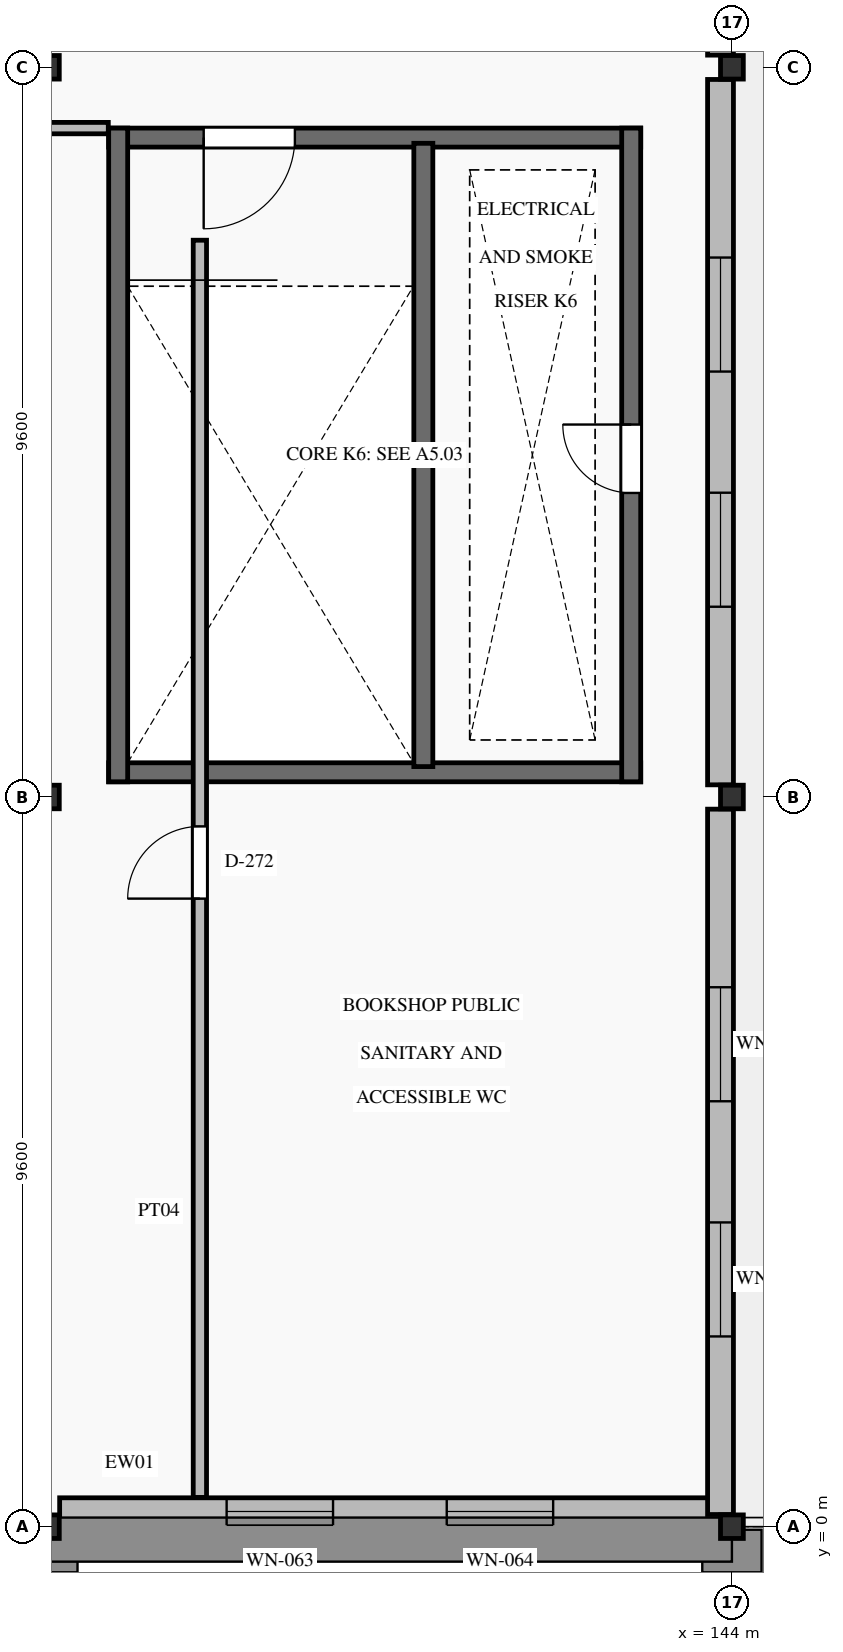
"""IFC4 building model, lengths in metres.
Left out: names, types, materials, properties, quantities, classifications, styles, units other than length and angle.
Written with IfcOpenShell. Run it as: python <this file> out.ifc"""

import sys

from ifc_helpers import new_model, si_unit, direction, frame, frame_2d, origin, origin_2d, place, context, subcontext, project, spatial, rectangle, i_section, extrude, element, fill, save


model = new_model("IFC4")
c1 = context("Model", 3, precision=1e-05, world=origin(), true_north=direction((0.0, 1.0)))
c2 = subcontext(c1, "Body", "Model", "MODEL_VIEW")
j1 = project(units=[si_unit("LENGTHUNIT", "METRE"), si_unit("PLANEANGLEUNIT", "RADIAN")], contexts=[c1])
p1 = place(None, origin())
s1 = spatial("IfcSite", under=j1, at=p1, CompositionType="ELEMENT")
p2 = place(p1, origin())
s2 = spatial("IfcBuilding", under=s1, at=p2, CompositionType="ELEMENT")
p3 = place(p2, frame((0.0, 0.0, 15.0)))
s3 = spatial("IfcBuildingStorey", under=s2, at=p3, CompositionType="ELEMENT", Elevation=15.0)
for number, where, z_axis, x_axis in (
    (1, (135.0, 0.0, 0.0), (0.0, 0.0, 1.0), (1.0, 0.0, 0.0)),
    (2, (135.0, 9.6, 0.0), (0.0, 0.0, 1.0), (1.0, 0.0, 0.0)),
    (3, (135.0, 19.2, 0.0), (0.0, 0.0, 1.0), (1.0, 0.0, 0.0)),
    (4, (144.0, 0.0, 0.0), (0.0, 0.0, 1.0), (1.0, 0.0, 0.0)),
    (5, (144.0, 9.6, 0.0), (0.0, 0.0, 1.0), (1.0, 0.0, 0.0)),
    (6, (144.0, 19.2, 0.0), (0.0, 0.0, 1.0), (1.0, 0.0, 0.0)),
):
    element("IfcColumn", number, at=place(p3, frame(where, z_axis=z_axis, x_axis=x_axis)), inside=s3, PredefinedType="COLUMN", context=c2, shape_type="SweptSolid", body=[
        extrude(i_section(OverallWidth=0.3, OverallDepth=0.31, WebThickness=0.009, FlangeThickness=0.015, FilletRadius=0.027, at=origin_2d()), origin(), (0.0, 0.0, 1.0), 3.9),
    ])
p4 = place(p3, frame((135.155, 0.2, 0.0), z_axis=(0.0, 0.0, 1.0), x_axis=(1.0, 0.0, 0.0)))
e7 = element("IfcWall", 7, at=p4, inside=s3, PredefinedType="SOLIDWALL", context=c2, shape_type="SweptSolid", body=[
    extrude(rectangle(XDim=8.69, YDim=0.36, at=frame_2d((4.345, 0.0))), origin(), (0.0, 0.0, 1.0), 3.355),
])
p5 = place(p4, frame((2.197, 0.0, 0.95)))
e8 = element("IfcOpeningElement", 8, at=p5, cuts=e7, PredefinedType="OPENING", context=c2, shape_type="SweptSolid", body=[
    extrude(rectangle(XDim=1.4, YDim=2.0, at=frame_2d((0.7, 1.0))), frame((0.0, 0.195, 0.0), z_axis=(0.0, -1.0, 0.0), x_axis=(1.0, 0.0, 0.0)), (0.0, 0.0, 1.0), 0.39),
])
p6 = place(p4, frame((5.093, 0.0, 0.95)))
e9 = element("IfcOpeningElement", 9, at=p6, cuts=e7, PredefinedType="OPENING", context=c2, shape_type="SweptSolid", body=[
    extrude(rectangle(XDim=1.4, YDim=2.0, at=frame_2d((0.7, 1.0))), frame((0.0, 0.195, 0.0), z_axis=(0.0, -1.0, 0.0), x_axis=(1.0, 0.0, 0.0)), (0.0, 0.0, 1.0), 0.39),
])
p7 = place(p3, frame((143.85, 0.16, 0.0), z_axis=(0.0, 0.0, 1.0), x_axis=(0.0, 1.0, 0.0)))
e10 = element("IfcWall", 10, at=p7, inside=s3, PredefinedType="SOLIDWALL", context=c2, shape_type="SweptSolid", body=[
    extrude(rectangle(XDim=9.28, YDim=0.34, at=frame_2d((4.64, 0.0))), origin(), (0.0, 0.0, 1.0), 3.335),
])
p8 = place(p7, frame((2.343, 0.0, 0.95)))
e11 = element("IfcOpeningElement", 11, at=p8, cuts=e10, PredefinedType="OPENING", context=c2, shape_type="SweptSolid", body=[
    extrude(rectangle(XDim=1.5, YDim=2.1, at=frame_2d((0.75, 1.05))), frame((0.0, 0.185, 0.0), z_axis=(0.0, -1.0, 0.0), x_axis=(1.0, 0.0, 0.0)), (0.0, 0.0, 1.0), 0.37),
])
p9 = place(p7, frame((5.437, 0.0, 0.95)))
e12 = element("IfcOpeningElement", 12, at=p9, cuts=e10, PredefinedType="OPENING", context=c2, shape_type="SweptSolid", body=[
    extrude(rectangle(XDim=1.5, YDim=2.1, at=frame_2d((0.75, 1.05))), frame((0.0, 0.185, 0.0), z_axis=(0.0, -1.0, 0.0), x_axis=(1.0, 0.0, 0.0)), (0.0, 0.0, 1.0), 0.37),
])
p10 = place(p3, frame((143.85, 9.76, 0.0), z_axis=(0.0, 0.0, 1.0), x_axis=(0.0, 1.0, 0.0)))
e13 = element("IfcWall", 13, at=p10, inside=s3, PredefinedType="SOLIDWALL", context=c2, shape_type="SweptSolid", body=[
    extrude(rectangle(XDim=9.28, YDim=0.34, at=frame_2d((4.64, 0.0))), origin(), (0.0, 0.0, 1.0), 3.335),
])
p11 = place(p10, frame((2.343, 0.0, 0.95)))
e14 = element("IfcOpeningElement", 14, at=p11, cuts=e13, PredefinedType="OPENING", context=c2, shape_type="SweptSolid", body=[
    extrude(rectangle(XDim=1.5, YDim=2.1, at=frame_2d((0.75, 1.05))), frame((0.0, 0.185, 0.0), z_axis=(0.0, -1.0, 0.0), x_axis=(1.0, 0.0, 0.0)), (0.0, 0.0, 1.0), 0.37),
])
p12 = place(p10, frame((5.437, 0.0, 0.95)))
e15 = element("IfcOpeningElement", 15, at=p12, cuts=e13, PredefinedType="OPENING", context=c2, shape_type="SweptSolid", body=[
    extrude(rectangle(XDim=1.5, YDim=2.1, at=frame_2d((0.75, 1.05))), frame((0.0, 0.185, 0.0), z_axis=(0.0, -1.0, 0.0), x_axis=(1.0, 0.0, 0.0)), (0.0, 0.0, 1.0), 0.37),
])
p13 = place(p3, frame((143.85, 19.36, 0.0), z_axis=(0.0, 0.0, 1.0), x_axis=(0.0, 1.0, 0.0)))
e16 = element("IfcWall", 16, at=p13, inside=s3, PredefinedType="SOLIDWALL", context=c2, shape_type="SweptSolid", body=[
    extrude(rectangle(XDim=9.28, YDim=0.34, at=frame_2d((4.64, 0.0))), origin(), (0.0, 0.0, 1.0), 3.335),
])
p14 = place(p13, frame((2.343, 0.0, 0.95)))
e17 = element("IfcOpeningElement", 17, at=p14, cuts=e16, PredefinedType="OPENING", context=c2, shape_type="SweptSolid", body=[
    extrude(rectangle(XDim=1.5, YDim=2.1, at=frame_2d((0.75, 1.05))), frame((0.0, 0.185, 0.0), z_axis=(0.0, -1.0, 0.0), x_axis=(1.0, 0.0, 0.0)), (0.0, 0.0, 1.0), 0.37),
])
p15 = place(p13, frame((5.437, 0.0, 0.95)))
e18 = element("IfcOpeningElement", 18, at=p15, cuts=e16, PredefinedType="OPENING", context=c2, shape_type="SweptSolid", body=[
    extrude(rectangle(XDim=1.5, YDim=2.1, at=frame_2d((0.75, 1.05))), frame((0.0, 0.185, 0.0), z_axis=(0.0, -1.0, 0.0), x_axis=(1.0, 0.0, 0.0)), (0.0, 0.0, 1.0), 0.37),
])
p16 = place(p3, frame((135.8, 9.925, 0.0), z_axis=(0.0, 0.0, 1.0), x_axis=(1.0, 0.0, 0.0)))
e19 = element("IfcWall", 19, at=p16, inside=s3, PredefinedType="SHEAR", context=c2, shape_type="SweptSolid", body=[
    extrude(rectangle(XDim=7.0, YDim=0.25, at=frame_2d((3.5, 0.0))), origin(), (0.0, 0.0, 1.0), 3.9),
])
p17 = place(p3, frame((135.8, 18.275, 0.0), z_axis=(0.0, 0.0, 1.0), x_axis=(1.0, 0.0, 0.0)))
e20 = element("IfcWall", 20, at=p17, inside=s3, PredefinedType="SHEAR", context=c2, shape_type="SweptSolid", body=[
    extrude(rectangle(XDim=7.0, YDim=0.25, at=frame_2d((3.5, 0.0))), origin(), (0.0, 0.0, 1.0), 3.9),
])
p18 = place(p17, frame((1.25, 0.0, 0.0)))
e21 = element("IfcOpeningElement", 21, at=p18, cuts=e20, PredefinedType="OPENING", context=c2, shape_type="SweptSolid", body=[
    extrude(rectangle(XDim=1.2, YDim=2.15, at=frame_2d((0.6, 1.075))), frame((0.0, 0.14, 0.0), z_axis=(0.0, -1.0, 0.0), x_axis=(1.0, 0.0, 0.0)), (0.0, 0.0, 1.0), 0.28),
])
p19 = place(p3, frame((135.925, 9.8, 0.0), z_axis=(0.0, 0.0, 1.0), x_axis=(0.0, 1.0, 0.0)))
e22 = element("IfcWall", 22, at=p19, inside=s3, PredefinedType="SHEAR", context=c2, shape_type="SweptSolid", body=[
    extrude(rectangle(XDim=8.6, YDim=0.25, at=frame_2d((4.3, 0.0))), origin(), (0.0, 0.0, 1.0), 3.9),
])
p20 = place(p3, frame((142.675, 9.8, 0.0), z_axis=(0.0, 0.0, 1.0), x_axis=(0.0, 1.0, 0.0)))
e23 = element("IfcWall", 23, at=p20, inside=s3, PredefinedType="SHEAR", context=c2, shape_type="SweptSolid", body=[
    extrude(rectangle(XDim=8.6, YDim=0.25, at=frame_2d((4.3, 0.0))), origin(), (0.0, 0.0, 1.0), 3.9),
])
p21 = place(p20, frame((3.8, 0.0, 0.0)))
e24 = element("IfcOpeningElement", 24, at=p21, cuts=e23, PredefinedType="OPENING", context=c2, shape_type="SweptSolid", body=[
    extrude(rectangle(XDim=0.9, YDim=2.05, at=frame_2d((0.45, 1.025))), frame((0.0, 0.14, 0.0), z_axis=(0.0, -1.0, 0.0), x_axis=(1.0, 0.0, 0.0)), (0.0, 0.0, 1.0), 0.28),
])
p22 = place(p3, frame((139.94, 10.0, 0.0), z_axis=(0.0, 0.0, 1.0), x_axis=(0.0, 1.0, 0.0)))
e25 = element("IfcWall", 25, at=p22, inside=s3, PredefinedType="SHEAR", context=c2, shape_type="SweptSolid", body=[
    extrude(rectangle(XDim=8.2, YDim=0.25, at=frame_2d((4.1, 0.0))), origin(), (0.0, 0.0, 1.0), 3.9),
])
p23 = place(p3, frame((129.75, 18.4, 0.0), z_axis=(0.0, 0.0, 1.0), x_axis=(1.0, 0.0, 0.0)))
e26 = element("IfcWall", 26, at=p23, inside=s3, PredefinedType="PARTITIONING", context=c2, shape_type="SweptSolid", body=[
    extrude(rectangle(XDim=6.045, YDim=0.15, at=frame_2d((3.022, 0.0))), origin(), (0.0, 0.0, 1.0), 3.64),
])
p24 = place(p23, frame((2.145, 0.0, 0.0)))
e27 = element("IfcOpeningElement", 27, at=p24, cuts=e26, PredefinedType="OPENING", context=c2, shape_type="SweptSolid", body=[
    extrude(rectangle(XDim=1.6, YDim=2.25, at=frame_2d((0.8, 1.125))), frame((0.0, 0.09, 0.0), z_axis=(0.0, -1.0, 0.0), x_axis=(1.0, 0.0, 0.0)), (0.0, 0.0, 1.0), 0.18),
])
p25 = place(p3, frame((137.0, 0.385, 0.0), z_axis=(0.0, 0.0, 1.0), x_axis=(0.0, 1.0, 0.0)))
e28 = element("IfcWall", 28, at=p25, inside=s3, PredefinedType="PARTITIONING", context=c2, shape_type="SweptSolid", body=[
    extrude(rectangle(XDim=16.54, YDim=0.175, at=frame_2d((8.27, 0.0))), origin(), (0.0, 0.0, 1.0), 3.64),
])
p26 = place(p25, frame((7.878, 0.0, 0.0)))
e29 = element("IfcOpeningElement", 29, at=p26, cuts=e28, PredefinedType="OPENING", context=c2, shape_type="SweptSolid", body=[
    extrude(rectangle(XDim=0.95, YDim=2.1, at=frame_2d((0.475, 1.05))), frame((0.0, 0.103, 0.0), z_axis=(0.0, -1.0, 0.0), x_axis=(1.0, 0.0, 0.0)), (0.0, 0.0, 1.0), 0.205),
])
p27 = place(p5, origin())
e30 = element("IfcWindow", 30, at=p27, inside=s3, PartitioningType="SINGLE_PANEL", PredefinedType="WINDOW", context=c2, shape_type="SweptSolid", body=[
    extrude(rectangle(XDim=1.4, YDim=2.0, at=frame_2d((0.7, 1.0))), frame((0.0, 0.03, 0.0), z_axis=(0.0, -1.0, 0.0), x_axis=(1.0, 0.0, 0.0)), (0.0, 0.0, 1.0), 0.06),
])
fill(e8, e30)
p28 = place(p6, origin())
e31 = element("IfcWindow", 31, at=p28, inside=s3, PartitioningType="SINGLE_PANEL", PredefinedType="WINDOW", context=c2, shape_type="SweptSolid", body=[
    extrude(rectangle(XDim=1.4, YDim=2.0, at=frame_2d((0.7, 1.0))), frame((0.0, 0.03, 0.0), z_axis=(0.0, -1.0, 0.0), x_axis=(1.0, 0.0, 0.0)), (0.0, 0.0, 1.0), 0.06),
])
fill(e9, e31)
p29 = place(p8, origin())
e32 = element("IfcWindow", 32, at=p29, inside=s3, PartitioningType="SINGLE_PANEL", PredefinedType="WINDOW", context=c2, shape_type="SweptSolid", body=[
    extrude(rectangle(XDim=1.5, YDim=2.1, at=frame_2d((0.75, 1.05))), frame((0.0, 0.03, 0.0), z_axis=(0.0, -1.0, 0.0), x_axis=(1.0, 0.0, 0.0)), (0.0, 0.0, 1.0), 0.06),
])
fill(e11, e32)
p30 = place(p9, origin())
e33 = element("IfcWindow", 33, at=p30, inside=s3, PartitioningType="SINGLE_PANEL", PredefinedType="WINDOW", context=c2, shape_type="SweptSolid", body=[
    extrude(rectangle(XDim=1.5, YDim=2.1, at=frame_2d((0.75, 1.05))), frame((0.0, 0.03, 0.0), z_axis=(0.0, -1.0, 0.0), x_axis=(1.0, 0.0, 0.0)), (0.0, 0.0, 1.0), 0.06),
])
fill(e12, e33)
p31 = place(p11, origin())
e34 = element("IfcWindow", 34, at=p31, inside=s3, PartitioningType="SINGLE_PANEL", PredefinedType="WINDOW", context=c2, shape_type="SweptSolid", body=[
    extrude(rectangle(XDim=1.5, YDim=2.1, at=frame_2d((0.75, 1.05))), frame((0.0, 0.03, 0.0), z_axis=(0.0, -1.0, 0.0), x_axis=(1.0, 0.0, 0.0)), (0.0, 0.0, 1.0), 0.06),
])
fill(e14, e34)
p32 = place(p12, origin())
e35 = element("IfcWindow", 35, at=p32, inside=s3, PartitioningType="SINGLE_PANEL", PredefinedType="WINDOW", context=c2, shape_type="SweptSolid", body=[
    extrude(rectangle(XDim=1.5, YDim=2.1, at=frame_2d((0.75, 1.05))), frame((0.0, 0.03, 0.0), z_axis=(0.0, -1.0, 0.0), x_axis=(1.0, 0.0, 0.0)), (0.0, 0.0, 1.0), 0.06),
])
fill(e15, e35)
p33 = place(p18, frame((1.2, 0.0, 0.0), z_axis=(0.0, 0.0, 1.0), x_axis=(-1.0, 0.0, 0.0)))
e36 = element("IfcDoor", 36, at=p33, inside=s3, OperationType="SINGLE_SWING_LEFT", PredefinedType="DOOR", context=c2, shape_type="SweptSolid", body=[
    extrude(rectangle(XDim=1.2, YDim=2.15, at=frame_2d((0.6, 1.075))), frame((0.0, 0.025, 0.0), z_axis=(0.0, -1.0, 0.0), x_axis=(1.0, 0.0, 0.0)), (0.0, 0.0, 1.0), 0.05),
])
fill(e21, e36)
p34 = place(p21, origin())
e37 = element("IfcDoor", 37, at=p34, inside=s3, OperationType="SINGLE_SWING_RIGHT", PredefinedType="DOOR", context=c2, shape_type="SweptSolid", body=[
    extrude(rectangle(XDim=0.9, YDim=2.05, at=frame_2d((0.45, 1.025))), frame((0.0, 0.025, 0.0), z_axis=(0.0, -1.0, 0.0), x_axis=(1.0, 0.0, 0.0)), (0.0, 0.0, 1.0), 0.05),
])
fill(e24, e37)
p35 = place(p26, origin())
e38 = element("IfcDoor", 38, at=p35, inside=s3, OperationType="SINGLE_SWING_LEFT", PredefinedType="DOOR", context=c2, shape_type="SweptSolid", body=[
    extrude(rectangle(XDim=0.95, YDim=2.1, at=frame_2d((0.475, 1.05))), frame((0.0, 0.025, 0.0), z_axis=(0.0, -1.0, 0.0), x_axis=(1.0, 0.0, 0.0)), (0.0, 0.0, 1.0), 0.05),
])
fill(e29, e38)
save(model, sys.argv[1])
